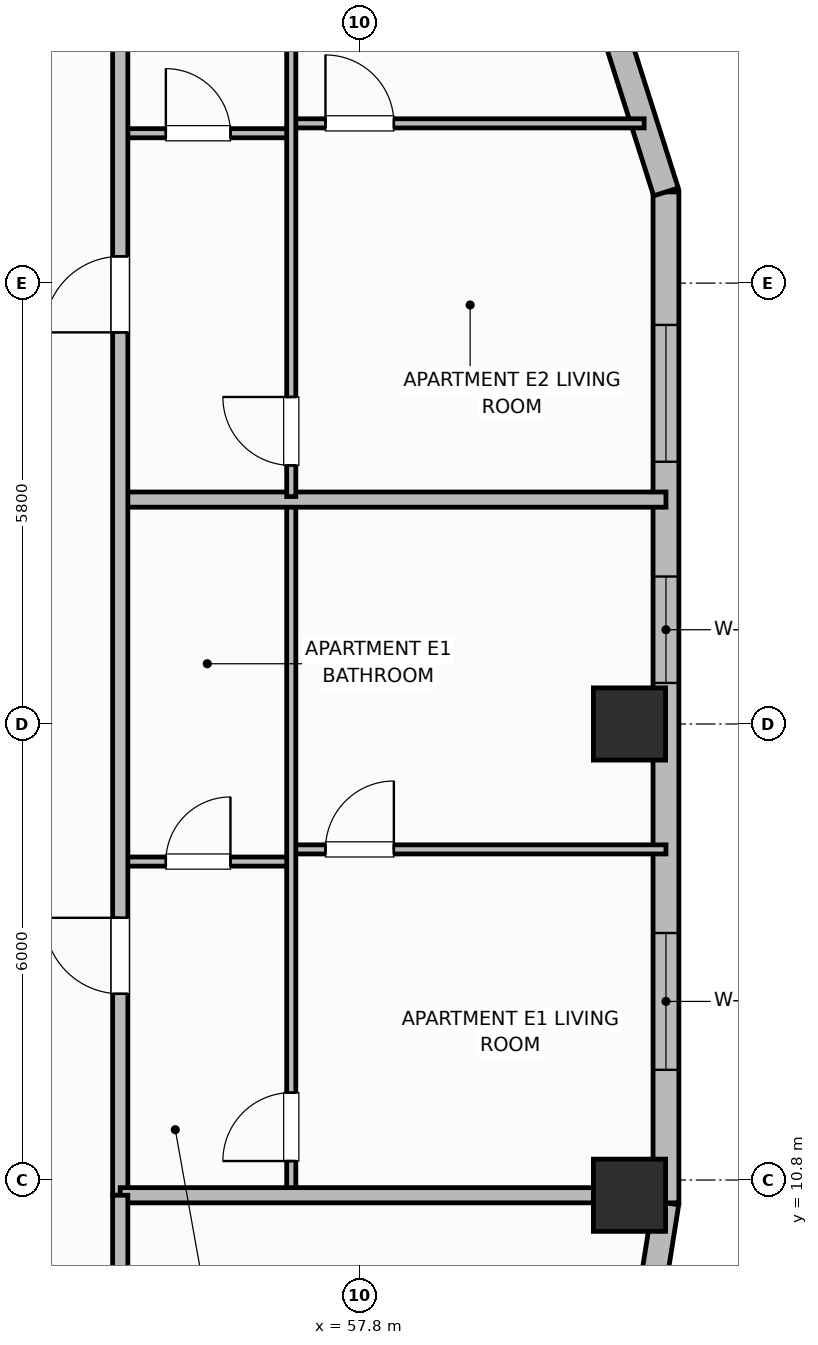
"""IFC4 building model, lengths in metres.
Left out: names, types, materials, properties, quantities, classifications, styles, units other than length and angle.
Written with IfcOpenShell. Run it as: python <this file> out.ifc"""

import sys

from ifc_helpers import new_model, si_unit, direction, frame, frame_2d, origin, origin_2d, place, context, subcontext, project, spatial, rectangle, extrude, element, fill, save


model = new_model("IFC4")
c1 = context("Model", 3, precision=1e-05, world=origin(), true_north=direction((0.0, 1.0)))
c2 = subcontext(c1, "Body", "Model", "MODEL_VIEW")
j1 = project(units=[si_unit("LENGTHUNIT", "METRE"), si_unit("PLANEANGLEUNIT", "RADIAN")], contexts=[c1])
p1 = place(None, origin())
s1 = spatial("IfcSite", under=j1, at=p1, CompositionType="ELEMENT")
p2 = place(p1, origin())
s2 = spatial("IfcBuilding", under=s1, at=p2, CompositionType="ELEMENT")
p3 = place(p2, frame((0.0, 0.0, 177.4)))
s3 = spatial("IfcBuildingStorey", under=s2, at=p3, CompositionType="ELEMENT", Elevation=177.4)
for number, where, z_axis, x_axis in (
    (1, (61.35, 10.6, 0.0), (0.0, 0.0, 1.0), (1.0, 0.0, 0.0)),
    (2, (61.35, 16.8, 0.0), (0.0, 0.0, 1.0), (1.0, 0.0, 0.0)),
):
    element("IfcColumn", number, at=place(p3, frame(where, z_axis=z_axis, x_axis=x_axis)), inside=s3, PredefinedType="COLUMN", context=c2, shape_type="SweptSolid", body=[
        extrude(rectangle(XDim=0.95, YDim=0.95, at=origin_2d()), origin(), (0.0, 0.0, 1.0), 3.7),
    ])
p4 = place(p3, frame((61.652, 9.378, 0.0), z_axis=(0.0, 0.0, 1.0), x_axis=(0.156514556949, 0.987675651954, 0.0)))
e3 = element("IfcWall", 3, at=p4, inside=s3, PredefinedType="SOLIDWALL", context=c2, shape_type="SweptSolid", body=[
    extrude(rectangle(XDim=1.135, YDim=0.34, at=frame_2d((0.568, 0.0))), origin(), (0.0, 0.0, 1.0), 2.72),
])
p5 = place(p3, frame((61.83, 10.5, 0.0), z_axis=(0.0, 0.0, 1.0), x_axis=(0.0, 1.0, 0.0)))
e4 = element("IfcWall", 4, at=p5, inside=s3, PredefinedType="SOLIDWALL", context=c2, shape_type="SweptSolid", body=[
    extrude(rectangle(XDim=13.3, YDim=0.34, at=frame_2d((6.65, 0.0))), origin(), (0.0, 0.0, 1.0), 2.72),
])
p6 = place(p5, frame((1.75, 0.0, 0.75)))
e5 = element("IfcOpeningElement", 5, at=p6, cuts=e4, PredefinedType="OPENING", context=c2, shape_type="SweptSolid", body=[
    extrude(rectangle(XDim=1.8, YDim=1.85, at=frame_2d((0.9, 0.925))), frame((0.0, 0.18, 0.0), z_axis=(0.0, -1.0, 0.0), x_axis=(1.0, 0.0, 0.0)), (0.0, 0.0, 1.0), 0.36),
])
p7 = place(p5, frame((6.84, 0.0, 0.71)))
e6 = element("IfcOpeningElement", 6, at=p7, cuts=e4, PredefinedType="OPENING", context=c2, shape_type="SweptSolid", body=[
    extrude(rectangle(XDim=1.4, YDim=1.85, at=frame_2d((0.7, 0.925))), frame((0.0, 0.18, 0.0), z_axis=(0.0, -1.0, 0.0), x_axis=(1.0, 0.0, 0.0)), (0.0, 0.0, 1.0), 0.36),
])
p8 = place(p5, frame((9.75, 0.0, 0.75)))
e7 = element("IfcOpeningElement", 7, at=p8, cuts=e4, PredefinedType="OPENING", context=c2, shape_type="SweptSolid", body=[
    extrude(rectangle(XDim=1.8, YDim=1.85, at=frame_2d((0.9, 0.925))), frame((0.0, 0.18, 0.0), z_axis=(0.0, -1.0, 0.0), x_axis=(1.0, 0.0, 0.0)), (0.0, 0.0, 1.0), 0.36),
])
p9 = place(p3, frame((61.83, 23.8, 0.0), z_axis=(0.0, 0.0, 1.0), x_axis=(-0.303286588318, 0.95289938889, 0.0)))
e8 = element("IfcWall", 8, at=p9, inside=s3, PredefinedType="SOLIDWALL", context=c2, shape_type="SweptSolid", body=[
    extrude(rectangle(XDim=2.309, YDim=0.34, at=frame_2d((1.154, 0.0))), origin(), (0.0, 0.0, 1.0), 2.72),
])
p10 = place(p3, frame((54.65, 14.99, 0.0), z_axis=(0.0, 0.0, 1.0), x_axis=(1.0, 0.0, 0.0)))
e9 = element("IfcWall", 9, at=p10, inside=s3, PredefinedType="PARTITIONING", context=c2, shape_type="SweptSolid", body=[
    extrude(rectangle(XDim=2.25, YDim=0.12, at=frame_2d((1.125, 0.0))), origin(), (0.0, 0.0, 1.0), 2.55),
])
p11 = place(p10, frame((0.6, 0.0, 0.0)))
e10 = element("IfcOpeningElement", 10, at=p11, cuts=e9, PredefinedType="OPENING", context=c2, shape_type="SweptSolid", body=[
    extrude(rectangle(XDim=0.85, YDim=2.1, at=frame_2d((0.425, 1.05))), frame((0.0, 0.07, 0.0), z_axis=(0.0, -1.0, 0.0), x_axis=(1.0, 0.0, 0.0)), (0.0, 0.0, 1.0), 0.14),
])
p12 = place(p3, frame((56.9, 15.15, 0.0), z_axis=(0.0, 0.0, 1.0), x_axis=(1.0, 0.0, 0.0)))
e11 = element("IfcWall", 11, at=p12, inside=s3, PredefinedType="PARTITIONING", context=c2, shape_type="SweptSolid", body=[
    extrude(rectangle(XDim=4.93, YDim=0.12, at=frame_2d((2.465, 0.0))), origin(), (0.0, 0.0, 1.0), 2.55),
])
p13 = place(p12, frame((0.45, 0.0, 0.0)))
e12 = element("IfcOpeningElement", 12, at=p13, cuts=e11, PredefinedType="OPENING", context=c2, shape_type="SweptSolid", body=[
    extrude(rectangle(XDim=0.9, YDim=2.1, at=frame_2d((0.45, 1.05))), frame((0.0, 0.07, 0.0), z_axis=(0.0, -1.0, 0.0), x_axis=(1.0, 0.0, 0.0)), (0.0, 0.0, 1.0), 0.14),
])
p14 = place(p3, frame((56.9, 10.64, 0.0), z_axis=(0.0, 0.0, 1.0), x_axis=(0.0, 1.0, 0.0)))
e13 = element("IfcWall", 13, at=p14, inside=s3, PredefinedType="PARTITIONING", context=c2, shape_type="SweptSolid", body=[
    extrude(rectangle(XDim=9.072, YDim=0.12, at=frame_2d((4.536, 0.0))), origin(), (0.0, 0.0, 1.0), 2.55),
])
p15 = place(p14, frame((0.41, 0.0, 0.0)))
e14 = element("IfcOpeningElement", 14, at=p15, cuts=e13, PredefinedType="OPENING", context=c2, shape_type="SweptSolid", body=[
    extrude(rectangle(XDim=0.9, YDim=2.1, at=frame_2d((0.45, 1.05))), frame((0.0, 0.07, 0.0), z_axis=(0.0, -1.0, 0.0), x_axis=(1.0, 0.0, 0.0)), (0.0, 0.0, 1.0), 0.14),
])
p16 = place(p3, frame((54.65, 19.752, 0.0), z_axis=(0.0, 0.0, 1.0), x_axis=(1.0, 0.0, 0.0)))
e15 = element("IfcWall", 15, at=p16, inside=s3, PredefinedType="PARTITIONING", context=c2, shape_type="SweptSolid", body=[
    extrude(rectangle(XDim=7.18, YDim=0.2, at=frame_2d((3.59, 0.0))), origin(), (0.0, 0.0, 1.0), 2.55),
])
p17 = place(p3, frame((54.65, 24.572, 0.0), z_axis=(0.0, 0.0, 1.0), x_axis=(1.0, 0.0, 0.0)))
e16 = element("IfcWall", 16, at=p17, inside=s3, PredefinedType="PARTITIONING", context=c2, shape_type="SweptSolid", body=[
    extrude(rectangle(XDim=2.25, YDim=0.12, at=frame_2d((1.125, 0.0))), origin(), (0.0, 0.0, 1.0), 2.55),
])
p18 = place(p17, frame((0.6, 0.0, 0.0)))
e17 = element("IfcOpeningElement", 17, at=p18, cuts=e16, PredefinedType="OPENING", context=c2, shape_type="SweptSolid", body=[
    extrude(rectangle(XDim=0.85, YDim=2.1, at=frame_2d((0.425, 1.05))), frame((0.0, 0.07, 0.0), z_axis=(0.0, -1.0, 0.0), x_axis=(1.0, 0.0, 0.0)), (0.0, 0.0, 1.0), 0.14),
])
p19 = place(p3, frame((56.9, 24.702, 0.0), z_axis=(0.0, 0.0, 1.0), x_axis=(1.0, 0.0, 0.0)))
e18 = element("IfcWall", 18, at=p19, inside=s3, PredefinedType="PARTITIONING", context=c2, shape_type="SweptSolid", body=[
    extrude(rectangle(XDim=4.643, YDim=0.12, at=frame_2d((2.322, 0.0))), origin(), (0.0, 0.0, 1.0), 2.55),
])
p20 = place(p19, frame((0.45, 0.0, 0.0)))
e19 = element("IfcOpeningElement", 19, at=p20, cuts=e18, PredefinedType="OPENING", context=c2, shape_type="SweptSolid", body=[
    extrude(rectangle(XDim=0.9, YDim=2.1, at=frame_2d((0.45, 1.05))), frame((0.0, 0.07, 0.0), z_axis=(0.0, -1.0, 0.0), x_axis=(1.0, 0.0, 0.0)), (0.0, 0.0, 1.0), 0.14),
])
p21 = place(p3, frame((56.9, 19.792, 0.0), z_axis=(0.0, 0.0, 1.0), x_axis=(0.0, 1.0, 0.0)))
e20 = element("IfcWall", 20, at=p21, inside=s3, PredefinedType="PARTITIONING", context=c2, shape_type="SweptSolid", body=[
    extrude(rectangle(XDim=9.968, YDim=0.12, at=frame_2d((4.984, 0.0))), origin(), (0.0, 0.0, 1.0), 2.55),
])
p22 = place(p21, frame((0.41, 0.0, 0.0)))
e21 = element("IfcOpeningElement", 21, at=p22, cuts=e20, PredefinedType="OPENING", context=c2, shape_type="SweptSolid", body=[
    extrude(rectangle(XDim=0.9, YDim=2.1, at=frame_2d((0.45, 1.05))), frame((0.0, 0.07, 0.0), z_axis=(0.0, -1.0, 0.0), x_axis=(1.0, 0.0, 0.0)), (0.0, 0.0, 1.0), 0.14),
])
p23 = place(p3, frame((54.65, 10.6, 0.0), z_axis=(0.0, 0.0, 1.0), x_axis=(0.0, 1.0, 0.0)))
e22 = element("IfcWall", 22, at=p23, inside=s3, PredefinedType="PARTITIONING", context=c2, shape_type="SweptSolid", body=[
    extrude(rectangle(XDim=35.2, YDim=0.2, at=frame_2d((17.6, 0.0))), origin(), (0.0, 0.0, 1.0), 2.55),
])
p24 = place(p23, frame((2.65, 0.0, 0.0)))
e23 = element("IfcOpeningElement", 23, at=p24, cuts=e22, PredefinedType="OPENING", context=c2, shape_type="SweptSolid", body=[
    extrude(rectangle(XDim=1.0, YDim=2.15, at=frame_2d((0.5, 1.075))), frame((0.0, 0.11, 0.0), z_axis=(0.0, -1.0, 0.0), x_axis=(1.0, 0.0, 0.0)), (0.0, 0.0, 1.0), 0.22),
])
p25 = place(p23, frame((11.352, 0.0, 0.0)))
e24 = element("IfcOpeningElement", 24, at=p25, cuts=e22, PredefinedType="OPENING", context=c2, shape_type="SweptSolid", body=[
    extrude(rectangle(XDim=1.0, YDim=2.15, at=frame_2d((0.5, 1.075))), frame((0.0, 0.11, 0.0), z_axis=(0.0, -1.0, 0.0), x_axis=(1.0, 0.0, 0.0)), (0.0, 0.0, 1.0), 0.22),
])
p26 = place(p23, frame((21.37, 0.0, 0.0)))
e25 = element("IfcOpeningElement", 25, at=p26, cuts=e22, PredefinedType="OPENING", context=c2, shape_type="SweptSolid", body=[
    extrude(rectangle(XDim=1.0, YDim=2.15, at=frame_2d((0.5, 1.075))), frame((0.0, 0.11, 0.0), z_axis=(0.0, -1.0, 0.0), x_axis=(1.0, 0.0, 0.0)), (0.0, 0.0, 1.0), 0.22),
])
p27 = place(p23, frame((27.302, 0.0, 0.0)))
e26 = element("IfcOpeningElement", 26, at=p27, cuts=e22, PredefinedType="OPENING", context=c2, shape_type="SweptSolid", body=[
    extrude(rectangle(XDim=1.0, YDim=2.15, at=frame_2d((0.5, 1.075))), frame((0.0, 0.11, 0.0), z_axis=(0.0, -1.0, 0.0), x_axis=(1.0, 0.0, 0.0)), (0.0, 0.0, 1.0), 0.22),
])
p28 = place(p3, frame((54.65, 10.6, 0.0), z_axis=(0.0, 0.0, 1.0), x_axis=(1.0, 0.0, 0.0)))
e27 = element("IfcWall", 27, at=p28, inside=s3, PredefinedType="PARTITIONING", context=c2, shape_type="SweptSolid", body=[
    extrude(rectangle(XDim=6.76, YDim=0.2, at=frame_2d((3.38, 0.0))), origin(), (0.0, 0.0, 1.0), 2.55),
])
p29 = place(p3, frame((54.65, 6.87, 0.0), z_axis=(0.0, 0.0, 1.0), x_axis=(0.0, 1.0, 0.0)))
e28 = element("IfcWall", 28, at=p29, inside=s3, PredefinedType="PARTITIONING", context=c2, shape_type="SweptSolid", body=[
    extrude(rectangle(XDim=3.73, YDim=0.2, at=frame_2d((1.865, 0.0))), origin(), (0.0, 0.0, 1.0), 2.55),
])
p30 = place(p6, origin())
e29 = element("IfcWindow", 29, at=p30, inside=s3, PartitioningType="SINGLE_PANEL", PredefinedType="WINDOW", context=c2, shape_type="SweptSolid", body=[
    extrude(rectangle(XDim=1.8, YDim=1.85, at=frame_2d((0.9, 0.925))), frame((0.0, 0.03, 0.0), z_axis=(0.0, -1.0, 0.0), x_axis=(1.0, 0.0, 0.0)), (0.0, 0.0, 1.0), 0.06),
])
fill(e5, e29)
p31 = place(p7, origin())
e30 = element("IfcWindow", 30, at=p31, inside=s3, PartitioningType="SINGLE_PANEL", PredefinedType="WINDOW", context=c2, shape_type="SweptSolid", body=[
    extrude(rectangle(XDim=1.4, YDim=1.85, at=frame_2d((0.7, 0.925))), frame((0.0, 0.03, 0.0), z_axis=(0.0, -1.0, 0.0), x_axis=(1.0, 0.0, 0.0)), (0.0, 0.0, 1.0), 0.06),
])
fill(e6, e30)
p32 = place(p8, origin())
e31 = element("IfcWindow", 31, at=p32, inside=s3, PartitioningType="SINGLE_PANEL", PredefinedType="WINDOW", context=c2, shape_type="SweptSolid", body=[
    extrude(rectangle(XDim=1.8, YDim=1.85, at=frame_2d((0.9, 0.925))), frame((0.0, 0.03, 0.0), z_axis=(0.0, -1.0, 0.0), x_axis=(1.0, 0.0, 0.0)), (0.0, 0.0, 1.0), 0.06),
])
fill(e7, e31)
p33 = place(p11, origin())
e32 = element("IfcDoor", 32, at=p33, inside=s3, OperationType="SINGLE_SWING_RIGHT", PredefinedType="DOOR", context=c2, shape_type="SweptSolid", body=[
    extrude(rectangle(XDim=0.85, YDim=2.1, at=frame_2d((0.425, 1.05))), frame((0.0, 0.025, 0.0), z_axis=(0.0, -1.0, 0.0), x_axis=(1.0, 0.0, 0.0)), (0.0, 0.0, 1.0), 0.05),
])
fill(e10, e32)
p34 = place(p13, origin())
e33 = element("IfcDoor", 33, at=p34, inside=s3, OperationType="SINGLE_SWING_RIGHT", PredefinedType="DOOR", context=c2, shape_type="SweptSolid", body=[
    extrude(rectangle(XDim=0.9, YDim=2.1, at=frame_2d((0.45, 1.05))), frame((0.0, 0.025, 0.0), z_axis=(0.0, -1.0, 0.0), x_axis=(1.0, 0.0, 0.0)), (0.0, 0.0, 1.0), 0.05),
])
fill(e12, e33)
p35 = place(p15, origin())
e34 = element("IfcDoor", 34, at=p35, inside=s3, OperationType="SINGLE_SWING_LEFT", PredefinedType="DOOR", context=c2, shape_type="SweptSolid", body=[
    extrude(rectangle(XDim=0.9, YDim=2.1, at=frame_2d((0.45, 1.05))), frame((0.0, 0.025, 0.0), z_axis=(0.0, -1.0, 0.0), x_axis=(1.0, 0.0, 0.0)), (0.0, 0.0, 1.0), 0.05),
])
fill(e14, e34)
p36 = place(p18, origin())
e35 = element("IfcDoor", 35, at=p36, inside=s3, OperationType="SINGLE_SWING_LEFT", PredefinedType="DOOR", context=c2, shape_type="SweptSolid", body=[
    extrude(rectangle(XDim=0.85, YDim=2.1, at=frame_2d((0.425, 1.05))), frame((0.0, 0.025, 0.0), z_axis=(0.0, -1.0, 0.0), x_axis=(1.0, 0.0, 0.0)), (0.0, 0.0, 1.0), 0.05),
])
fill(e17, e35)
p37 = place(p20, origin())
e36 = element("IfcDoor", 36, at=p37, inside=s3, OperationType="SINGLE_SWING_LEFT", PredefinedType="DOOR", context=c2, shape_type="SweptSolid", body=[
    extrude(rectangle(XDim=0.9, YDim=2.1, at=frame_2d((0.45, 1.05))), frame((0.0, 0.025, 0.0), z_axis=(0.0, -1.0, 0.0), x_axis=(1.0, 0.0, 0.0)), (0.0, 0.0, 1.0), 0.05),
])
fill(e19, e36)
p38 = place(p22, origin())
e37 = element("IfcDoor", 37, at=p38, inside=s3, OperationType="SINGLE_SWING_RIGHT", PredefinedType="DOOR", context=c2, shape_type="SweptSolid", body=[
    extrude(rectangle(XDim=0.9, YDim=2.1, at=frame_2d((0.45, 1.05))), frame((0.0, 0.025, 0.0), z_axis=(0.0, -1.0, 0.0), x_axis=(1.0, 0.0, 0.0)), (0.0, 0.0, 1.0), 0.05),
])
fill(e21, e37)
p39 = place(p24, origin())
e38 = element("IfcDoor", 38, at=p39, inside=s3, OperationType="SINGLE_SWING_RIGHT", PredefinedType="DOOR", context=c2, shape_type="SweptSolid", body=[
    extrude(rectangle(XDim=1.0, YDim=2.15, at=frame_2d((0.5, 1.075))), frame((0.0, 0.025, 0.0), z_axis=(0.0, -1.0, 0.0), x_axis=(1.0, 0.0, 0.0)), (0.0, 0.0, 1.0), 0.05),
])
fill(e23, e38)
p40 = place(p25, origin())
e39 = element("IfcDoor", 39, at=p40, inside=s3, OperationType="SINGLE_SWING_LEFT", PredefinedType="DOOR", context=c2, shape_type="SweptSolid", body=[
    extrude(rectangle(XDim=1.0, YDim=2.15, at=frame_2d((0.5, 1.075))), frame((0.0, 0.025, 0.0), z_axis=(0.0, -1.0, 0.0), x_axis=(1.0, 0.0, 0.0)), (0.0, 0.0, 1.0), 0.05),
])
fill(e24, e39)
save(model, sys.argv[1])
